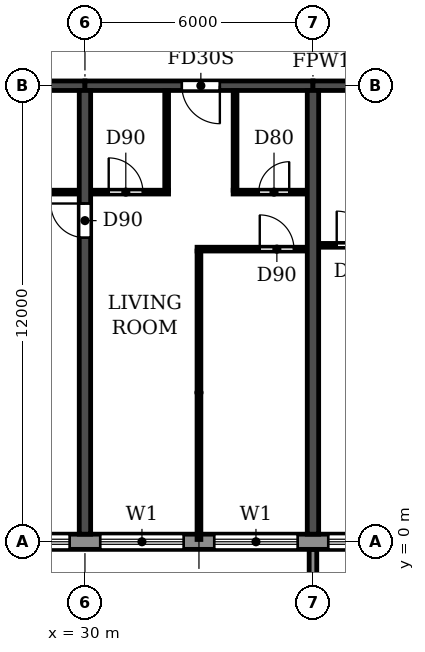
"""IFC4 building model, lengths in metres.
Left out: names, types, materials, properties, quantities, classifications, styles, units other than length and angle.
Written with IfcOpenShell. Run it as: python <this file> out.ifc"""

import sys

from ifc_helpers import new_model, si_unit, direction, frame, frame_2d, origin, place, context, subcontext, project, spatial, polyline, rectangle, outline, extrude, source, transform, mapped, element, fill, save


model = new_model("IFC4")
c1 = context("Model", 3, precision=1e-05, world=origin(), true_north=direction((0.0, 1.0)))
c2 = subcontext(c1, "Body", "Model", "MODEL_VIEW")
j1 = project(units=[si_unit("LENGTHUNIT", "METRE"), si_unit("PLANEANGLEUNIT", "RADIAN")], contexts=[c1])
p1 = place(None, origin())
s1 = spatial("IfcSite", under=j1, at=p1, CompositionType="ELEMENT")
p2 = place(p1, origin())
s2 = spatial("IfcBuilding", under=s1, at=p2, CompositionType="ELEMENT")
p3 = place(p2, frame((0.0, 0.0, 122.4)))
s3 = spatial("IfcBuildingStorey", under=s2, at=p3, CompositionType="ELEMENT", Elevation=122.4)
p4 = place(p3, frame((30.0, 0.2, 0.0), z_axis=(0.0, 0.0, 1.0), x_axis=(0.0, 1.0, 0.0)))
e1 = element("IfcWall", 1, at=p4, inside=s3, PredefinedType="SHEAR", context=c2, shape_type="SweptSolid", body=[
    extrude(rectangle(XDim=11.675, YDim=0.3, at=frame_2d((5.837, 0.0))), origin(), (0.0, 0.0, 1.0), 3.07),
])
p5 = place(p4, frame((7.8, 0.0, 0.0)))
e2 = element("IfcOpeningElement", 2, at=p5, cuts=e1, PredefinedType="OPENING", context=c2, shape_type="SweptSolid", body=[
    extrude(rectangle(XDim=0.9, YDim=2.1, at=frame_2d((0.45, 1.05))), frame((0.0, 0.16, 0.0), z_axis=(0.0, -1.0, 0.0), x_axis=(1.0, 0.0, 0.0)), (0.0, 0.0, 1.0), 0.32),
])
p6 = place(p3, frame((36.0, 0.2, 0.0), z_axis=(0.0, 0.0, 1.0), x_axis=(0.0, 1.0, 0.0)))
e3 = element("IfcWall", 3, at=p6, inside=s3, PredefinedType="SHEAR", context=c2, shape_type="SweptSolid", body=[
    extrude(rectangle(XDim=11.675, YDim=0.3, at=frame_2d((5.837, 0.0))), origin(), (0.0, 0.0, 1.0), 3.07),
])
p7 = place(p3, frame((24.0, 12.0, 0.0), z_axis=(0.0, 0.0, 1.0), x_axis=(1.0, 0.0, 0.0)))
e4 = element("IfcWall", 4, at=p7, inside=s3, PredefinedType="SHEAR", context=c2, shape_type="SweptSolid", body=[
    extrude(rectangle(XDim=6.0, YDim=0.25, at=frame_2d((3.0, 0.0))), origin(), (0.0, 0.0, 1.0), 2.47),
])
p8 = place(p3, frame((30.0, 12.0, 0.0), z_axis=(0.0, 0.0, 1.0), x_axis=(1.0, 0.0, 0.0)))
e5 = element("IfcWall", 5, at=p8, inside=s3, PredefinedType="SHEAR", context=c2, shape_type="SweptSolid", body=[
    extrude(rectangle(XDim=6.0, YDim=0.25, at=frame_2d((3.0, 0.0))), origin(), (0.0, 0.0, 1.0), 2.47),
])
p9 = place(p8, frame((2.55, 0.0, 0.0)))
e6 = element("IfcOpeningElement", 6, at=p9, cuts=e5, PredefinedType="OPENING", context=c2, shape_type="SweptSolid", body=[
    extrude(rectangle(XDim=1.0, YDim=2.1, at=frame_2d((0.5, 1.05))), frame((0.0, 0.135, 0.0), z_axis=(0.0, -1.0, 0.0), x_axis=(1.0, 0.0, 0.0)), (0.0, 0.0, 1.0), 0.27),
])
p10 = place(p3, frame((36.0, 12.0, 0.0), z_axis=(0.0, 0.0, 1.0), x_axis=(1.0, 0.0, 0.0)))
e7 = element("IfcWall", 7, at=p10, inside=s3, PredefinedType="SHEAR", context=c2, shape_type="SweptSolid", body=[
    extrude(rectangle(XDim=6.0, YDim=0.25, at=frame_2d((3.0, 0.0))), origin(), (0.0, 0.0, 1.0), 2.47),
])
p11 = place(p10, frame((2.55, 0.0, 0.0)))
e8 = element("IfcOpeningElement", 8, at=p11, cuts=e7, PredefinedType="OPENING", context=c2, shape_type="SweptSolid", body=[
    extrude(rectangle(XDim=1.0, YDim=2.1, at=frame_2d((0.5, 1.05))), frame((0.0, 0.135, 0.0), z_axis=(0.0, -1.0, 0.0), x_axis=(1.0, 0.0, 0.0)), (0.0, 0.0, 1.0), 0.27),
])
p12 = place(p3, frame((16.683, 0.0, 0.0), z_axis=(0.0, 0.0, 1.0), x_axis=(1.0, 0.0, 0.0)))
e9 = element("IfcWall", 9, at=p12, inside=s3, PredefinedType="STANDARD", context=c2, shape_type="SweptSolid", body=[
    extrude(rectangle(XDim=68.634, YDim=0.4, at=frame_2d((34.317, 0.0))), origin(), (0.0, 0.0, 1.0), 3.07),
])
p13 = place(p12, frame((1.717, 0.0, 0.9)))
e10 = element("IfcOpeningElement", 10, at=p13, cuts=e9, PredefinedType="OPENING", context=c2, shape_type="SweptSolid", body=[
    extrude(rectangle(XDim=2.2, YDim=1.5, at=frame_2d((1.1, 0.75))), frame((0.0, 0.21, 0.0), z_axis=(0.0, -1.0, 0.0), x_axis=(1.0, 0.0, 0.0)), (0.0, 0.0, 1.0), 0.42),
])
p14 = place(p12, frame((4.717, 0.0, 0.9)))
e11 = element("IfcOpeningElement", 11, at=p14, cuts=e9, PredefinedType="OPENING", context=c2, shape_type="SweptSolid", body=[
    extrude(rectangle(XDim=2.2, YDim=1.5, at=frame_2d((1.1, 0.75))), frame((0.0, 0.21, 0.0), z_axis=(0.0, -1.0, 0.0), x_axis=(1.0, 0.0, 0.0)), (0.0, 0.0, 1.0), 0.42),
])
p15 = place(p12, frame((7.717, 0.0, 0.9)))
e12 = element("IfcOpeningElement", 12, at=p15, cuts=e9, PredefinedType="OPENING", context=c2, shape_type="SweptSolid", body=[
    extrude(rectangle(XDim=2.2, YDim=1.5, at=frame_2d((1.1, 0.75))), frame((0.0, 0.21, 0.0), z_axis=(0.0, -1.0, 0.0), x_axis=(1.0, 0.0, 0.0)), (0.0, 0.0, 1.0), 0.42),
])
p16 = place(p12, frame((10.717, 0.0, 0.9)))
e13 = element("IfcOpeningElement", 13, at=p16, cuts=e9, PredefinedType="OPENING", context=c2, shape_type="SweptSolid", body=[
    extrude(rectangle(XDim=2.2, YDim=1.5, at=frame_2d((1.1, 0.75))), frame((0.0, 0.21, 0.0), z_axis=(0.0, -1.0, 0.0), x_axis=(1.0, 0.0, 0.0)), (0.0, 0.0, 1.0), 0.42),
])
p17 = place(p12, frame((13.717, 0.0, 0.9)))
e14 = element("IfcOpeningElement", 14, at=p17, cuts=e9, PredefinedType="OPENING", context=c2, shape_type="SweptSolid", body=[
    extrude(rectangle(XDim=2.2, YDim=1.5, at=frame_2d((1.1, 0.75))), frame((0.0, 0.21, 0.0), z_axis=(0.0, -1.0, 0.0), x_axis=(1.0, 0.0, 0.0)), (0.0, 0.0, 1.0), 0.42),
])
p18 = place(p12, frame((16.717, 0.0, 0.9)))
e15 = element("IfcOpeningElement", 15, at=p18, cuts=e9, PredefinedType="OPENING", context=c2, shape_type="SweptSolid", body=[
    extrude(rectangle(XDim=2.2, YDim=1.5, at=frame_2d((1.1, 0.75))), frame((0.0, 0.21, 0.0), z_axis=(0.0, -1.0, 0.0), x_axis=(1.0, 0.0, 0.0)), (0.0, 0.0, 1.0), 0.42),
])
p19 = place(p12, frame((19.717, 0.0, 0.9)))
e16 = element("IfcOpeningElement", 16, at=p19, cuts=e9, PredefinedType="OPENING", context=c2, shape_type="SweptSolid", body=[
    extrude(rectangle(XDim=2.2, YDim=1.5, at=frame_2d((1.1, 0.75))), frame((0.0, 0.21, 0.0), z_axis=(0.0, -1.0, 0.0), x_axis=(1.0, 0.0, 0.0)), (0.0, 0.0, 1.0), 0.42),
])
p20 = place(p12, frame((22.917, 0.0, 0.0)))
e17 = element("IfcOpeningElement", 17, at=p20, cuts=e9, PredefinedType="OPENING", context=c2, shape_type="SweptSolid", body=[
    extrude(rectangle(XDim=1.8, YDim=2.4, at=frame_2d((0.9, 1.2))), frame((0.0, 0.21, 0.0), z_axis=(0.0, -1.0, 0.0), x_axis=(1.0, 0.0, 0.0)), (0.0, 0.0, 1.0), 0.42),
])
p21 = place(p12, frame((25.717, 0.0, 0.9)))
e18 = element("IfcOpeningElement", 18, at=p21, cuts=e9, PredefinedType="OPENING", context=c2, shape_type="SweptSolid", body=[
    extrude(rectangle(XDim=2.2, YDim=1.5, at=frame_2d((1.1, 0.75))), frame((0.0, 0.21, 0.0), z_axis=(0.0, -1.0, 0.0), x_axis=(1.0, 0.0, 0.0)), (0.0, 0.0, 1.0), 0.42),
])
p22 = place(p12, frame((28.717, 0.0, 0.9)))
e19 = element("IfcOpeningElement", 19, at=p22, cuts=e9, PredefinedType="OPENING", context=c2, shape_type="SweptSolid", body=[
    extrude(rectangle(XDim=2.2, YDim=1.5, at=frame_2d((1.1, 0.75))), frame((0.0, 0.21, 0.0), z_axis=(0.0, -1.0, 0.0), x_axis=(1.0, 0.0, 0.0)), (0.0, 0.0, 1.0), 0.42),
])
p23 = place(p12, frame((31.717, 0.0, 0.9)))
e20 = element("IfcOpeningElement", 20, at=p23, cuts=e9, PredefinedType="OPENING", context=c2, shape_type="SweptSolid", body=[
    extrude(rectangle(XDim=2.2, YDim=1.5, at=frame_2d((1.1, 0.75))), frame((0.0, 0.21, 0.0), z_axis=(0.0, -1.0, 0.0), x_axis=(1.0, 0.0, 0.0)), (0.0, 0.0, 1.0), 0.42),
])
p24 = place(p12, frame((34.917, 0.0, 0.0)))
e21 = element("IfcOpeningElement", 21, at=p24, cuts=e9, PredefinedType="OPENING", context=c2, shape_type="SweptSolid", body=[
    extrude(rectangle(XDim=1.8, YDim=2.4, at=frame_2d((0.9, 1.2))), frame((0.0, 0.21, 0.0), z_axis=(0.0, -1.0, 0.0), x_axis=(1.0, 0.0, 0.0)), (0.0, 0.0, 1.0), 0.42),
])
p25 = place(p12, frame((37.717, 0.0, 0.9)))
e22 = element("IfcOpeningElement", 22, at=p25, cuts=e9, PredefinedType="OPENING", context=c2, shape_type="SweptSolid", body=[
    extrude(rectangle(XDim=2.2, YDim=1.5, at=frame_2d((1.1, 0.75))), frame((0.0, 0.21, 0.0), z_axis=(0.0, -1.0, 0.0), x_axis=(1.0, 0.0, 0.0)), (0.0, 0.0, 1.0), 0.42),
])
p26 = place(p12, frame((40.717, 0.0, 0.9)))
e23 = element("IfcOpeningElement", 23, at=p26, cuts=e9, PredefinedType="OPENING", context=c2, shape_type="SweptSolid", body=[
    extrude(rectangle(XDim=2.2, YDim=1.5, at=frame_2d((1.1, 0.75))), frame((0.0, 0.21, 0.0), z_axis=(0.0, -1.0, 0.0), x_axis=(1.0, 0.0, 0.0)), (0.0, 0.0, 1.0), 0.42),
])
p27 = place(p12, frame((43.717, 0.0, 0.9)))
e24 = element("IfcOpeningElement", 24, at=p27, cuts=e9, PredefinedType="OPENING", context=c2, shape_type="SweptSolid", body=[
    extrude(rectangle(XDim=2.2, YDim=1.5, at=frame_2d((1.1, 0.75))), frame((0.0, 0.21, 0.0), z_axis=(0.0, -1.0, 0.0), x_axis=(1.0, 0.0, 0.0)), (0.0, 0.0, 1.0), 0.42),
])
p28 = place(p12, frame((46.917, 0.0, 0.0)))
e25 = element("IfcOpeningElement", 25, at=p28, cuts=e9, PredefinedType="OPENING", context=c2, shape_type="SweptSolid", body=[
    extrude(rectangle(XDim=1.8, YDim=2.4, at=frame_2d((0.9, 1.2))), frame((0.0, 0.21, 0.0), z_axis=(0.0, -1.0, 0.0), x_axis=(1.0, 0.0, 0.0)), (0.0, 0.0, 1.0), 0.42),
])
p29 = place(p12, frame((49.717, 0.0, 0.9)))
e26 = element("IfcOpeningElement", 26, at=p29, cuts=e9, PredefinedType="OPENING", context=c2, shape_type="SweptSolid", body=[
    extrude(rectangle(XDim=2.2, YDim=1.5, at=frame_2d((1.1, 0.75))), frame((0.0, 0.21, 0.0), z_axis=(0.0, -1.0, 0.0), x_axis=(1.0, 0.0, 0.0)), (0.0, 0.0, 1.0), 0.42),
])
p30 = place(p12, frame((52.717, 0.0, 0.9)))
e27 = element("IfcOpeningElement", 27, at=p30, cuts=e9, PredefinedType="OPENING", context=c2, shape_type="SweptSolid", body=[
    extrude(rectangle(XDim=2.2, YDim=1.5, at=frame_2d((1.1, 0.75))), frame((0.0, 0.21, 0.0), z_axis=(0.0, -1.0, 0.0), x_axis=(1.0, 0.0, 0.0)), (0.0, 0.0, 1.0), 0.42),
])
p31 = place(p12, frame((55.717, 0.0, 0.9)))
e28 = element("IfcOpeningElement", 28, at=p31, cuts=e9, PredefinedType="OPENING", context=c2, shape_type="SweptSolid", body=[
    extrude(rectangle(XDim=2.2, YDim=1.5, at=frame_2d((1.1, 0.75))), frame((0.0, 0.21, 0.0), z_axis=(0.0, -1.0, 0.0), x_axis=(1.0, 0.0, 0.0)), (0.0, 0.0, 1.0), 0.42),
])
p32 = place(p12, frame((58.917, 0.0, 0.0)))
e29 = element("IfcOpeningElement", 29, at=p32, cuts=e9, PredefinedType="OPENING", context=c2, shape_type="SweptSolid", body=[
    extrude(rectangle(XDim=1.8, YDim=2.4, at=frame_2d((0.9, 1.2))), frame((0.0, 0.21, 0.0), z_axis=(0.0, -1.0, 0.0), x_axis=(1.0, 0.0, 0.0)), (0.0, 0.0, 1.0), 0.42),
])
p33 = place(p12, frame((61.717, 0.0, 0.9)))
e30 = element("IfcOpeningElement", 30, at=p33, cuts=e9, PredefinedType="OPENING", context=c2, shape_type="SweptSolid", body=[
    extrude(rectangle(XDim=2.2, YDim=1.5, at=frame_2d((1.1, 0.75))), frame((0.0, 0.21, 0.0), z_axis=(0.0, -1.0, 0.0), x_axis=(1.0, 0.0, 0.0)), (0.0, 0.0, 1.0), 0.42),
])
p34 = place(p12, frame((64.717, 0.0, 0.9)))
e31 = element("IfcOpeningElement", 31, at=p34, cuts=e9, PredefinedType="OPENING", context=c2, shape_type="SweptSolid", body=[
    extrude(rectangle(XDim=2.2, YDim=1.5, at=frame_2d((1.1, 0.75))), frame((0.0, 0.21, 0.0), z_axis=(0.0, -1.0, 0.0), x_axis=(1.0, 0.0, 0.0)), (0.0, 0.0, 1.0), 0.42),
])
m1 = source(origin(), c2, "Body", "SweptSolid", [
    extrude(outline(polyline([(0.0, 0.0), (0.2, 0.0), (0.2, 1.65), (0.0, 1.65), (0.0, 0.0)])), origin(), (0.0, 0.0, 1.0), 3.1),
])
p35 = place(p3, frame((35.9, -1.85, 0.0)))
e32 = element("IfcWall", 32, at=p35, inside=s3, PredefinedType="STANDARD", context=c2, shape_type="MappedRepresentation", body=[
    mapped(m1, transform((0.0, 0.0, 0.0))),
])
p36 = place(p3, frame((32.95, 7.7, 0.0), z_axis=(0.0, 0.0, 1.0), x_axis=(1.0, 0.0, 0.0)))
e33 = element("IfcWall", 33, at=p36, inside=s3, PredefinedType="PARTITIONING", context=c2, shape_type="SweptSolid", body=[
    extrude(rectangle(XDim=2.89, YDim=0.1, at=frame_2d((1.445, 0.0))), origin(), (0.0, 0.0, 1.0), 3.07),
])
p37 = place(p36, frame((1.65, 0.0, 0.0)))
e34 = element("IfcOpeningElement", 34, at=p37, cuts=e33, PredefinedType="OPENING", context=c2, shape_type="SweptSolid", body=[
    extrude(rectangle(XDim=0.9, YDim=2.1, at=frame_2d((0.45, 1.05))), frame((0.0, 0.06, 0.0), z_axis=(0.0, -1.0, 0.0), x_axis=(1.0, 0.0, 0.0)), (0.0, 0.0, 1.0), 0.12),
])
p38 = place(p3, frame((36.16, 7.8, 0.0), z_axis=(0.0, 0.0, 1.0), x_axis=(1.0, 0.0, 0.0)))
e35 = element("IfcWall", 35, at=p38, inside=s3, PredefinedType="PARTITIONING", context=c2, shape_type="SweptSolid", body=[
    extrude(rectangle(XDim=2.04, YDim=0.1, at=frame_2d((1.02, 0.0))), origin(), (0.0, 0.0, 1.0), 3.07),
])
p39 = place(p38, frame((0.465, 0.0, 0.0)))
e36 = element("IfcOpeningElement", 36, at=p39, cuts=e35, PredefinedType="OPENING", context=c2, shape_type="SweptSolid", body=[
    extrude(rectangle(XDim=0.9, YDim=2.1, at=frame_2d((0.45, 1.05))), frame((0.0, 0.06, 0.0), z_axis=(0.0, -1.0, 0.0), x_axis=(1.0, 0.0, 0.0)), (0.0, 0.0, 1.0), 0.12),
])
p40 = place(p3, frame((27.1, 9.2, 0.0), z_axis=(0.0, 0.0, 1.0), x_axis=(1.0, 0.0, 0.0)))
e37 = element("IfcWall", 37, at=p40, inside=s3, PredefinedType="PARTITIONING", context=c2, shape_type="SweptSolid", body=[
    extrude(rectangle(XDim=2.74, YDim=0.1, at=frame_2d((1.37, 0.0))), origin(), (0.0, 0.0, 1.0), 3.07),
])
p41 = place(p40, frame((1.0, 0.0, 0.0)))
e38 = element("IfcOpeningElement", 38, at=p41, cuts=e37, PredefinedType="OPENING", context=c2, shape_type="SweptSolid", body=[
    extrude(rectangle(XDim=0.8, YDim=2.1, at=frame_2d((0.4, 1.05))), frame((0.0, 0.06, 0.0), z_axis=(0.0, -1.0, 0.0), x_axis=(1.0, 0.0, 0.0)), (0.0, 0.0, 1.0), 0.12),
])
p42 = place(p3, frame((30.16, 9.2, 0.0), z_axis=(0.0, 0.0, 1.0), x_axis=(1.0, 0.0, 0.0)))
e39 = element("IfcWall", 39, at=p42, inside=s3, PredefinedType="PARTITIONING", context=c2, shape_type="SweptSolid", body=[
    extrude(rectangle(XDim=2.04, YDim=0.1, at=frame_2d((1.02, 0.0))), origin(), (0.0, 0.0, 1.0), 3.07),
])
p43 = place(p42, frame((0.465, 0.0, 0.0)))
e40 = element("IfcOpeningElement", 40, at=p43, cuts=e39, PredefinedType="OPENING", context=c2, shape_type="SweptSolid", body=[
    extrude(rectangle(XDim=0.9, YDim=2.1, at=frame_2d((0.45, 1.05))), frame((0.0, 0.06, 0.0), z_axis=(0.0, -1.0, 0.0), x_axis=(1.0, 0.0, 0.0)), (0.0, 0.0, 1.0), 0.12),
])
p44 = place(p3, frame((33.9, 9.2, 0.0), z_axis=(0.0, 0.0, 1.0), x_axis=(1.0, 0.0, 0.0)))
e41 = element("IfcWall", 41, at=p44, inside=s3, PredefinedType="PARTITIONING", context=c2, shape_type="SweptSolid", body=[
    extrude(rectangle(XDim=1.94, YDim=0.1, at=frame_2d((0.97, 0.0))), origin(), (0.0, 0.0, 1.0), 3.07),
])
p45 = place(p44, frame((0.675, 0.0, 0.0)))
e42 = element("IfcOpeningElement", 42, at=p45, cuts=e41, PredefinedType="OPENING", context=c2, shape_type="SweptSolid", body=[
    extrude(rectangle(XDim=0.8, YDim=2.1, at=frame_2d((0.4, 1.05))), frame((0.0, 0.06, 0.0), z_axis=(0.0, -1.0, 0.0), x_axis=(1.0, 0.0, 0.0)), (0.0, 0.0, 1.0), 0.12),
])
p46 = place(p3, frame((32.15, 9.25, 0.0), z_axis=(0.0, 0.0, 1.0), x_axis=(0.0, 1.0, 0.0)))
e43 = element("IfcWall", 43, at=p46, inside=s3, PredefinedType="PARTITIONING", context=c2, shape_type="SweptSolid", body=[
    extrude(rectangle(XDim=2.615, YDim=0.1, at=frame_2d((1.308, 0.0))), origin(), (0.0, 0.0, 1.0), 3.07),
])
p47 = place(p3, frame((33.0, 0.06, 0.0), z_axis=(0.0, 0.0, 1.0), x_axis=(0.0, 1.0, 0.0)))
e44 = element("IfcWall", 44, at=p47, inside=s3, PredefinedType="PARTITIONING", context=c2, shape_type="SweptSolid", body=[
    extrude(rectangle(XDim=7.59, YDim=0.1, at=frame_2d((3.795, 0.0))), origin(), (0.0, 0.0, 1.0), 3.07),
])
p48 = place(p3, frame((33.95, 9.25, 0.0), z_axis=(0.0, 0.0, 1.0), x_axis=(0.0, 1.0, 0.0)))
e45 = element("IfcWall", 45, at=p48, inside=s3, PredefinedType="PARTITIONING", context=c2, shape_type="SweptSolid", body=[
    extrude(rectangle(XDim=2.615, YDim=0.1, at=frame_2d((1.308, 0.0))), origin(), (0.0, 0.0, 1.0), 3.07),
])
p49 = place(p16, origin())
e46 = element("IfcWindow", 46, at=p49, inside=s3, PartitioningType="DOUBLE_PANEL_HORIZONTAL", PredefinedType="WINDOW", context=c2, shape_type="SweptSolid", body=[
    extrude(rectangle(XDim=2.2, YDim=1.5, at=frame_2d((1.1, 0.75))), frame((0.0, 0.03, 0.0), z_axis=(0.0, -1.0, 0.0), x_axis=(1.0, 0.0, 0.0)), (0.0, 0.0, 1.0), 0.06),
])
fill(e13, e46)
p50 = place(p17, origin())
e47 = element("IfcWindow", 47, at=p50, inside=s3, PartitioningType="DOUBLE_PANEL_HORIZONTAL", PredefinedType="WINDOW", context=c2, shape_type="SweptSolid", body=[
    extrude(rectangle(XDim=2.2, YDim=1.5, at=frame_2d((1.1, 0.75))), frame((0.0, 0.03, 0.0), z_axis=(0.0, -1.0, 0.0), x_axis=(1.0, 0.0, 0.0)), (0.0, 0.0, 1.0), 0.06),
])
fill(e14, e47)
p51 = place(p18, origin())
e48 = element("IfcWindow", 48, at=p51, inside=s3, PartitioningType="DOUBLE_PANEL_HORIZONTAL", PredefinedType="WINDOW", context=c2, shape_type="SweptSolid", body=[
    extrude(rectangle(XDim=2.2, YDim=1.5, at=frame_2d((1.1, 0.75))), frame((0.0, 0.03, 0.0), z_axis=(0.0, -1.0, 0.0), x_axis=(1.0, 0.0, 0.0)), (0.0, 0.0, 1.0), 0.06),
])
fill(e15, e48)
p52 = place(p19, origin())
e49 = element("IfcWindow", 49, at=p52, inside=s3, PartitioningType="DOUBLE_PANEL_HORIZONTAL", PredefinedType="WINDOW", context=c2, shape_type="SweptSolid", body=[
    extrude(rectangle(XDim=2.2, YDim=1.5, at=frame_2d((1.1, 0.75))), frame((0.0, 0.03, 0.0), z_axis=(0.0, -1.0, 0.0), x_axis=(1.0, 0.0, 0.0)), (0.0, 0.0, 1.0), 0.06),
])
fill(e16, e49)
p53 = place(p5, origin())
e50 = element("IfcDoor", 50, at=p53, inside=s3, OperationType="SINGLE_SWING_RIGHT", PredefinedType="DOOR", context=c2, shape_type="SweptSolid", body=[
    extrude(rectangle(XDim=0.9, YDim=2.1, at=frame_2d((0.45, 1.05))), frame((0.0, 0.025, 0.0), z_axis=(0.0, -1.0, 0.0), x_axis=(1.0, 0.0, 0.0)), (0.0, 0.0, 1.0), 0.05),
])
fill(e2, e50)
p54 = place(p43, origin())
e51 = element("IfcDoor", 51, at=p54, inside=s3, OperationType="SINGLE_SWING_LEFT", PredefinedType="DOOR", context=c2, shape_type="SweptSolid", body=[
    extrude(rectangle(XDim=0.9, YDim=2.1, at=frame_2d((0.45, 1.05))), frame((0.0, 0.025, 0.0), z_axis=(0.0, -1.0, 0.0), x_axis=(1.0, 0.0, 0.0)), (0.0, 0.0, 1.0), 0.05),
])
fill(e40, e51)
p55 = place(p9, frame((1.0, 0.0, 0.0), z_axis=(0.0, 0.0, 1.0), x_axis=(-1.0, 0.0, 0.0)))
e52 = element("IfcDoor", 52, at=p55, inside=s3, OperationType="SINGLE_SWING_LEFT", PredefinedType="DOOR", context=c2, shape_type="SweptSolid", body=[
    extrude(rectangle(XDim=1.0, YDim=2.1, at=frame_2d((0.5, 1.05))), frame((0.0, 0.025, 0.0), z_axis=(0.0, -1.0, 0.0), x_axis=(1.0, 0.0, 0.0)), (0.0, 0.0, 1.0), 0.05),
])
fill(e6, e52)
p56 = place(p45, origin())
e53 = element("IfcDoor", 53, at=p56, inside=s3, OperationType="SINGLE_SWING_RIGHT", PredefinedType="DOOR", context=c2, shape_type="SweptSolid", body=[
    extrude(rectangle(XDim=0.8, YDim=2.1, at=frame_2d((0.4, 1.05))), frame((0.0, 0.025, 0.0), z_axis=(0.0, -1.0, 0.0), x_axis=(1.0, 0.0, 0.0)), (0.0, 0.0, 1.0), 0.05),
])
fill(e42, e53)
p57 = place(p37, origin())
e54 = element("IfcDoor", 54, at=p57, inside=s3, OperationType="SINGLE_SWING_LEFT", PredefinedType="DOOR", context=c2, shape_type="SweptSolid", body=[
    extrude(rectangle(XDim=0.9, YDim=2.1, at=frame_2d((0.45, 1.05))), frame((0.0, 0.025, 0.0), z_axis=(0.0, -1.0, 0.0), x_axis=(1.0, 0.0, 0.0)), (0.0, 0.0, 1.0), 0.05),
])
fill(e34, e54)
p58 = place(p39, origin())
e55 = element("IfcDoor", 55, at=p58, inside=s3, OperationType="SINGLE_SWING_LEFT", PredefinedType="DOOR", context=c2, shape_type="SweptSolid", body=[
    extrude(rectangle(XDim=0.9, YDim=2.1, at=frame_2d((0.45, 1.05))), frame((0.0, 0.025, 0.0), z_axis=(0.0, -1.0, 0.0), x_axis=(1.0, 0.0, 0.0)), (0.0, 0.0, 1.0), 0.05),
])
fill(e36, e55)
save(model, sys.argv[1])
